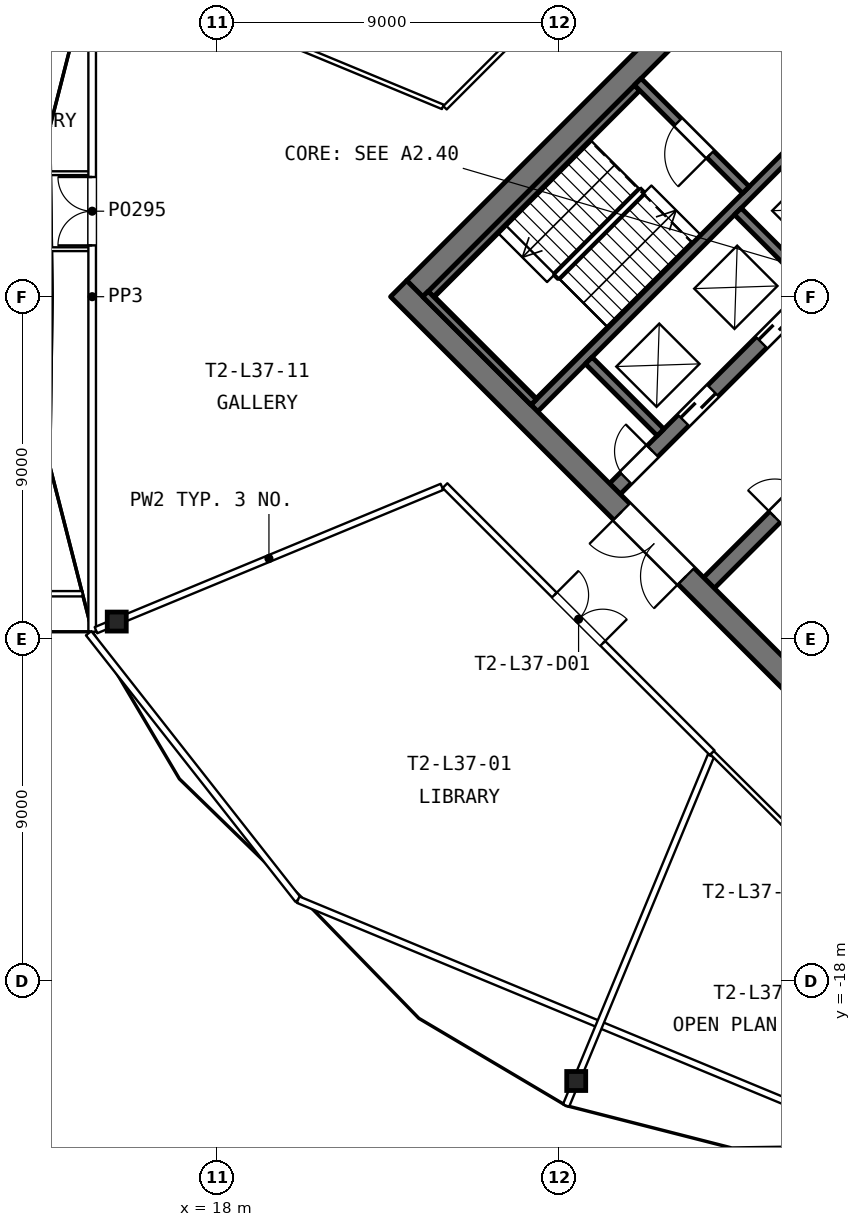
"""IFC4 building model, lengths in metres.
Left out: names, types, materials, properties, quantities, classifications, styles, units other than length and angle.
Written with IfcOpenShell. Run it as: python <this file> out.ifc"""

import sys

from ifc_helpers import new_model, si_unit, direction, frame, frame_2d, origin, origin_2d, place, context, subcontext, project, spatial, rectangle, hollow_rectangle, extrude, element, fill, save


model = new_model("IFC4")
c1 = context("Model", 3, precision=1e-05, world=origin(), true_north=direction((0.0, 1.0)))
c2 = subcontext(c1, "Body", "Model", "MODEL_VIEW")
j1 = project(units=[si_unit("LENGTHUNIT", "METRE"), si_unit("PLANEANGLEUNIT", "RADIAN")], contexts=[c1])
p1 = place(None, origin())
s1 = spatial("IfcSite", under=j1, at=p1, CompositionType="ELEMENT")
p2 = place(p1, origin())
s2 = spatial("IfcBuilding", under=s1, at=p2, CompositionType="ELEMENT")
p3 = place(p2, frame((0.0, 0.0, 156.8)))
s3 = spatial("IfcBuildingStorey", under=s2, at=p3, CompositionType="ELEMENT", Elevation=156.8)
for number, where, z_axis, x_axis in (
    (1, (15.361, -8.549, 0.0), (0.0, 0.0, 1.0), (1.0, 0.0, 0.0)),
    (2, (27.451, -20.639, 0.0), (0.0, 0.0, 1.0), (1.0, 0.0, 0.0)),
):
    element("IfcColumn", number, at=place(p3, frame(where, z_axis=z_axis, x_axis=x_axis)), inside=s3, PredefinedType="COLUMN", context=c2, shape_type="SweptSolid", body=[
        extrude(hollow_rectangle(XDim=0.5, YDim=0.5, WallThickness=0.03, at=origin_2d()), origin(), (0.0, 0.0, 1.0), 3.9),
    ])
p4 = place(p3, frame((30.944, -7.531, 0.0), z_axis=(0.0, 0.0, 1.0), x_axis=(0.707106781187, 0.707106781187, 0.0)))
e3 = element("IfcWall", 3, at=p4, inside=s3, PredefinedType="SHEAR", context=c2, shape_type="SweptSolid", body=[
    extrude(rectangle(XDim=17.8, YDim=0.4, at=frame_2d((8.9, 0.0))), origin(), (0.0, 0.0, 1.0), 3.7),
])
p5 = place(p4, frame((12.65, 0.0, 0.0)))
e4 = element("IfcOpeningElement", 4, at=p5, cuts=e3, PredefinedType="OPENING", context=c2, shape_type="SweptSolid", body=[
    extrude(rectangle(XDim=1.2, YDim=2.1, at=frame_2d((0.6, 1.05))), frame((0.0, 0.21, 0.0), z_axis=(0.0, -1.0, 0.0), x_axis=(1.0, 0.0, 0.0)), (0.0, 0.0, 1.0), 0.42),
])
p6 = place(p4, frame((15.65, 0.0, 0.0)))
e5 = element("IfcOpeningElement", 5, at=p6, cuts=e3, PredefinedType="OPENING", context=c2, shape_type="SweptSolid", body=[
    extrude(rectangle(XDim=1.1, YDim=2.1, at=frame_2d((0.55, 1.05))), frame((0.0, 0.21, 0.0), z_axis=(0.0, -1.0, 0.0), x_axis=(1.0, 0.0, 0.0)), (0.0, 0.0, 1.0), 0.42),
])
p7 = place(p4, frame((2.45, 0.0, 0.0)))
e6 = element("IfcOpeningElement", 6, at=p7, cuts=e3, PredefinedType="OPENING", context=c2, shape_type="SweptSolid", body=[
    extrude(rectangle(XDim=1.0, YDim=2.1, at=frame_2d((0.5, 1.05))), frame((0.0, 0.21, 0.0), z_axis=(0.0, -1.0, 0.0), x_axis=(1.0, 0.0, 0.0)), (0.0, 0.0, 1.0), 0.42),
])
p8 = place(p4, frame((8.4, 0.0, 0.0)))
e7 = element("IfcOpeningElement", 7, at=p8, cuts=e3, PredefinedType="OPENING", context=c2, shape_type="SweptSolid", body=[
    extrude(rectangle(XDim=1.0, YDim=2.1, at=frame_2d((0.5, 1.05))), frame((0.0, 0.21, 0.0), z_axis=(0.0, -1.0, 0.0), x_axis=(1.0, 0.0, 0.0)), (0.0, 0.0, 1.0), 0.42),
])
p9 = place(p3, frame((28.469, -5.056, 0.0), z_axis=(0.0, 0.0, 1.0), x_axis=(0.707106781187, 0.707106781187, 0.0)))
e8 = element("IfcWall", 8, at=p9, inside=s3, PredefinedType="SHEAR", context=c2, shape_type="SweptSolid", body=[
    extrude(rectangle(XDim=17.8, YDim=0.4, at=frame_2d((8.9, 0.0))), origin(), (0.0, 0.0, 1.0), 3.7),
])
p10 = place(p9, frame((0.4, 0.0, 0.0)))
e9 = element("IfcOpeningElement", 9, at=p10, cuts=e8, PredefinedType="OPENING", context=c2, shape_type="SweptSolid", body=[
    extrude(rectangle(XDim=1.0, YDim=2.1, at=frame_2d((0.5, 1.05))), frame((0.0, 0.21, 0.0), z_axis=(0.0, -1.0, 0.0), x_axis=(1.0, 0.0, 0.0)), (0.0, 0.0, 1.0), 0.42),
])
p11 = place(p9, frame((2.55, 0.0, 0.0)))
e10 = element("IfcOpeningElement", 10, at=p11, cuts=e8, PredefinedType="OPENING", context=c2, shape_type="SweptSolid", body=[
    extrude(rectangle(XDim=1.1, YDim=2.1, at=frame_2d((0.55, 1.05))), frame((0.0, 0.21, 0.0), z_axis=(0.0, -1.0, 0.0), x_axis=(1.0, 0.0, 0.0)), (0.0, 0.0, 1.0), 0.42),
])
p12 = place(p9, frame((5.45, 0.0, 0.0)))
e11 = element("IfcOpeningElement", 11, at=p12, cuts=e8, PredefinedType="OPENING", context=c2, shape_type="SweptSolid", body=[
    extrude(rectangle(XDim=1.1, YDim=2.1, at=frame_2d((0.55, 1.05))), frame((0.0, 0.21, 0.0), z_axis=(0.0, -1.0, 0.0), x_axis=(1.0, 0.0, 0.0)), (0.0, 0.0, 1.0), 0.42),
])
p13 = place(p9, frame((8.35, 0.0, 0.0)))
e12 = element("IfcOpeningElement", 12, at=p13, cuts=e8, PredefinedType="OPENING", context=c2, shape_type="SweptSolid", body=[
    extrude(rectangle(XDim=1.1, YDim=2.1, at=frame_2d((0.55, 1.05))), frame((0.0, 0.21, 0.0), z_axis=(0.0, -1.0, 0.0), x_axis=(1.0, 0.0, 0.0)), (0.0, 0.0, 1.0), 0.42),
])
p14 = place(p9, frame((11.25, 0.0, 0.0)))
e13 = element("IfcOpeningElement", 13, at=p14, cuts=e8, PredefinedType="OPENING", context=c2, shape_type="SweptSolid", body=[
    extrude(rectangle(XDim=1.1, YDim=2.1, at=frame_2d((0.55, 1.05))), frame((0.0, 0.21, 0.0), z_axis=(0.0, -1.0, 0.0), x_axis=(1.0, 0.0, 0.0)), (0.0, 0.0, 1.0), 0.42),
])
p15 = place(p9, frame((14.15, 0.0, 0.0)))
e14 = element("IfcOpeningElement", 14, at=p15, cuts=e8, PredefinedType="OPENING", context=c2, shape_type="SweptSolid", body=[
    extrude(rectangle(XDim=1.1, YDim=2.1, at=frame_2d((0.55, 1.05))), frame((0.0, 0.21, 0.0), z_axis=(0.0, -1.0, 0.0), x_axis=(1.0, 0.0, 0.0)), (0.0, 0.0, 1.0), 0.42),
])
p16 = place(p9, frame((16.4, 0.0, 0.0)))
e15 = element("IfcOpeningElement", 15, at=p16, cuts=e8, PredefinedType="OPENING", context=c2, shape_type="SweptSolid", body=[
    extrude(rectangle(XDim=1.0, YDim=2.1, at=frame_2d((0.5, 1.05))), frame((0.0, 0.21, 0.0), z_axis=(0.0, -1.0, 0.0), x_axis=(1.0, 0.0, 0.0)), (0.0, 0.0, 1.0), 0.42),
])
p17 = place(p3, frame((26.348, -2.935, 0.0), z_axis=(0.0, 0.0, 1.0), x_axis=(0.707106781187, 0.707106781187, 0.0)))
e16 = element("IfcWall", 16, at=p17, inside=s3, PredefinedType="SHEAR", context=c2, shape_type="SweptSolid", body=[
    extrude(rectangle(XDim=15.775, YDim=0.25, at=frame_2d((7.888, 0.0))), origin(), (0.0, 0.0, 1.0), 3.7),
])
p18 = place(p3, frame((23.625, 0.071, 0.0), z_axis=(0.0, 0.0, 1.0), x_axis=(0.707122685701, 0.707090876314, 0.0)))
e17 = element("IfcWall", 17, at=p18, inside=s3, PredefinedType="SHEAR", context=c2, shape_type="SweptSolid", body=[
    extrude(rectangle(XDim=7.675, YDim=0.2, at=frame_2d((3.837, 0.0))), origin(), (0.0, 0.0, 1.0), 3.7),
])
p19 = place(p3, frame((23.201, 0.212, 0.0), z_axis=(0.0, 0.0, 1.0), x_axis=(0.707106781187, 0.707106781187, 0.0)))
e18 = element("IfcWall", 18, at=p19, inside=s3, PredefinedType="SHEAR", context=c2, shape_type="SweptSolid", body=[
    extrude(rectangle(XDim=17.8, YDim=0.6, at=frame_2d((8.9, 0.0))), origin(), (0.0, 0.0, 1.0), 3.7),
])
p20 = place(p19, frame((9.1, 0.0, 0.0)))
e19 = element("IfcOpeningElement", 19, at=p20, cuts=e18, PredefinedType="OPENING", context=c2, shape_type="SweptSolid", body=[
    extrude(rectangle(XDim=1.2, YDim=2.1, at=frame_2d((0.6, 1.05))), frame((0.0, 0.31, 0.0), z_axis=(0.0, -1.0, 0.0), x_axis=(1.0, 0.0, 0.0)), (0.0, 0.0, 1.0), 0.62),
])
p21 = place(p19, frame((15.6, 0.0, 0.0)))
e20 = element("IfcOpeningElement", 20, at=p21, cuts=e18, PredefinedType="OPENING", context=c2, shape_type="SweptSolid", body=[
    extrude(rectangle(XDim=1.0, YDim=2.1, at=frame_2d((0.5, 1.05))), frame((0.0, 0.31, 0.0), z_axis=(0.0, -1.0, 0.0), x_axis=(1.0, 0.0, 0.0)), (0.0, 0.0, 1.0), 0.62),
])
p22 = place(p3, frame((36.212, -13.223, 0.0), z_axis=(0.0, 0.0, 1.0), x_axis=(-0.707106781187, 0.707106781187, 0.0)))
e21 = element("IfcWall", 21, at=p22, inside=s3, PredefinedType="SHEAR", context=c2, shape_type="SweptSolid", body=[
    extrude(rectangle(XDim=19.0, YDim=0.6, at=frame_2d((9.5, 0.0))), origin(), (0.0, 0.0, 1.0), 3.7),
])
p23 = place(p22, frame((8.3, 0.0, 0.0)))
e22 = element("IfcOpeningElement", 22, at=p23, cuts=e21, PredefinedType="OPENING", context=c2, shape_type="SweptSolid", body=[
    extrude(rectangle(XDim=2.4, YDim=2.1, at=frame_2d((1.2, 1.05))), frame((0.0, 0.31, 0.0), z_axis=(0.0, -1.0, 0.0), x_axis=(1.0, 0.0, 0.0)), (0.0, 0.0, 1.0), 0.62),
])
p24 = place(p3, frame((26.33, -2.775, 0.0), z_axis=(0.0, 0.0, 1.0), x_axis=(-0.707106781187, 0.707106781187, 0.0)))
e23 = element("IfcWall", 23, at=p24, inside=s3, PredefinedType="SHEAR", context=c2, shape_type="SweptSolid", body=[
    extrude(rectangle(XDim=4.025, YDim=0.2, at=frame_2d((2.013, 0.0))), origin(), (0.0, 0.0, 1.0), 3.7),
])
for number, where, z_axis, x_axis in (
    (24, (29.671, -3.571, 0.0), (0.0, 0.0, 1.0), (-0.707, 0.707, 0.0)),
    (25, (33.596, 0.354, 0.0), (0.0, 0.0, 1.0), (-0.707, 0.707, 0.0)),
):
    element("IfcWall", number, at=place(p3, frame(where, z_axis=z_axis, x_axis=x_axis)), inside=s3, PredefinedType="SHEAR", context=c2, shape_type="SweptSolid", body=[
        extrude(rectangle(XDim=2.675, YDim=0.25, at=frame_2d((1.337, 0.0))), origin(), (0.0, 0.0, 1.0), 3.7),
    ])
p25 = place(p3, frame((31.917, 2.811, 0.0), z_axis=(0.0, 0.0, 1.0), x_axis=(-0.707106781187, 0.707106781187, 0.0)))
e26 = element("IfcWall", 26, at=p25, inside=s3, PredefinedType="SHEAR", context=c2, shape_type="SweptSolid", body=[
    extrude(rectangle(XDim=4.025, YDim=0.25, at=frame_2d((2.013, 0.0))), origin(), (0.0, 0.0, 1.0), 3.7),
])
p26 = place(p25, frame((1.325, 0.0, 0.0)))
e27 = element("IfcOpeningElement", 27, at=p26, cuts=e26, PredefinedType="OPENING", context=c2, shape_type="SweptSolid", body=[
    extrude(rectangle(XDim=1.2, YDim=2.1, at=frame_2d((0.6, 1.05))), frame((0.0, 0.135, 0.0), z_axis=(0.0, -1.0, 0.0), x_axis=(1.0, 0.0, 0.0)), (0.0, 0.0, 1.0), 0.27),
])
p27 = place(p3, frame((34.321, 5.215, 0.0), z_axis=(0.0, 0.0, 1.0), x_axis=(-0.70707645213, 0.707137108942, 0.0)))
e28 = element("IfcWall", 28, at=p27, inside=s3, PredefinedType="SHEAR", context=c2, shape_type="SweptSolid", body=[
    extrude(rectangle(XDim=4.025, YDim=0.25, at=frame_2d((2.012, 0.0))), origin(), (0.0, 0.0, 1.0), 3.7),
])
p28 = place(p27, frame((1.025, 0.0, 0.0)))
e29 = element("IfcOpeningElement", 29, at=p28, cuts=e28, PredefinedType="OPENING", context=c2, shape_type="SweptSolid", body=[
    extrude(rectangle(XDim=1.2, YDim=2.1, at=frame_2d((0.6, 1.05))), frame((0.0, 0.135, 0.0), z_axis=(0.0, -1.0, 0.0), x_axis=(1.0, 0.0, 0.0)), (0.0, 0.0, 1.0), 0.27),
])
p29 = place(p3, frame((14.814, 8.776, 0.0), z_axis=(0.0, 0.0, 1.0), x_axis=(0.923880680571, -0.382680660691, 0.0)))
e30 = element("IfcWall", 30, at=p29, inside=s3, PredefinedType="PARTITIONING", context=c2, shape_type="SweptSolid", body=[
    extrude(rectangle(XDim=9.878, YDim=0.125, at=frame_2d((4.939, 0.0))), origin(), (0.0, 0.0, 1.0), 2.2),
])
p30 = place(p3, frame((14.814, -8.776, 0.0), z_axis=(0.0, 0.0, 1.0), x_axis=(0.923877614903, 0.382688061849, 0.0)))
e31 = element("IfcWall", 31, at=p30, inside=s3, PredefinedType="PARTITIONING", context=c2, shape_type="SweptSolid", body=[
    extrude(rectangle(XDim=9.853, YDim=0.175, at=frame_2d((4.927, 0.0))), origin(), (0.0, 0.0, 1.0), 2.2),
])
p31 = place(p3, frame((27.183, -21.286, 0.0), z_axis=(0.0, 0.0, 1.0), x_axis=(0.38267936462, 0.923881217416, 0.0)))
e32 = element("IfcWall", 32, at=p31, inside=s3, PredefinedType="PARTITIONING", context=c2, shape_type="SweptSolid", body=[
    extrude(rectangle(XDim=9.961, YDim=0.175, at=frame_2d((4.981, 0.0))), origin(), (0.0, 0.0, 1.0), 2.2),
])
p32 = place(p3, frame((23.998, -4.971, 0.0), z_axis=(0.0, 0.0, 1.0), x_axis=(0.707106781187, -0.707106781187, 0.0)))
e33 = element("IfcWall", 33, at=p32, inside=s3, PredefinedType="PARTITIONING", context=c2, shape_type="SweptSolid", body=[
    extrude(rectangle(XDim=9.943, YDim=0.175, at=frame_2d((4.972, 0.0))), origin(), (0.0, 0.0, 1.0), 2.5),
])
p33 = place(p32, frame((4.071, 0.0, 0.0)))
e34 = element("IfcOpeningElement", 34, at=p33, cuts=e33, PredefinedType="OPENING", context=c2, shape_type="SweptSolid", body=[
    extrude(rectangle(XDim=1.8, YDim=2.1, at=frame_2d((0.9, 1.05))), frame((0.0, 0.098, 0.0), z_axis=(0.0, -1.0, 0.0), x_axis=(1.0, 0.0, 0.0)), (0.0, 0.0, 1.0), 0.195),
])
p34 = place(p3, frame((31.029, -12.002, 0.0), z_axis=(0.0, 0.0, 1.0), x_axis=(0.709332667605, -0.704873865786, 0.0)))
e35 = element("IfcWall", 35, at=p34, inside=s3, PredefinedType="PARTITIONING", context=c2, shape_type="SweptSolid", body=[
    extrude(rectangle(XDim=7.009, YDim=0.125, at=frame_2d((3.504, 0.0))), origin(), (0.0, 0.0, 1.0), 2.5),
])
p35 = place(p34, frame((2.604, 0.0, 0.0)))
e36 = element("IfcOpeningElement", 36, at=p35, cuts=e35, PredefinedType="OPENING", context=c2, shape_type="SweptSolid", body=[
    extrude(rectangle(XDim=1.8, YDim=2.1, at=frame_2d((0.9, 1.05))), frame((0.0, 0.073, 0.0), z_axis=(0.0, -1.0, 0.0), x_axis=(1.0, 0.0, 0.0)), (0.0, 0.0, 1.0), 0.145),
])
p36 = place(p3, frame((33.188, 14.164, 0.0), z_axis=(0.0, 0.0, 1.0), x_axis=(-0.706994076888, -0.707219467524, 0.0)))
e37 = element("IfcWall", 37, at=p36, inside=s3, PredefinedType="PARTITIONING", context=c2, shape_type="SweptSolid", body=[
    extrude(rectangle(XDim=12.998, YDim=0.125, at=frame_2d((6.499, 0.0))), origin(), (0.0, 0.0, 1.0), 2.5),
])
p37 = place(p36, frame((5.599, 0.0, 0.0)))
e38 = element("IfcOpeningElement", 38, at=p37, cuts=e37, PredefinedType="OPENING", context=c2, shape_type="SweptSolid", body=[
    extrude(rectangle(XDim=1.8, YDim=2.1, at=frame_2d((0.9, 1.05))), frame((0.0, 0.073, 0.0), z_axis=(0.0, -1.0, 0.0), x_axis=(1.0, 0.0, 0.0)), (0.0, 0.0, 1.0), 0.145),
])
p38 = place(p3, frame((9.617, 3.25, 0.0), z_axis=(0.0, 0.0, 1.0), x_axis=(1.0, 0.0, 0.0)))
e39 = element("IfcWall", 39, at=p38, inside=s3, PredefinedType="PARTITIONING", context=c2, shape_type="SweptSolid", body=[
    extrude(rectangle(XDim=5.097, YDim=0.1, at=frame_2d((2.548, 0.0))), origin(), (0.0, 0.0, 1.0), 2.9),
])
p39 = place(p38, frame((1.648, 0.0, 0.0)))
e40 = element("IfcOpeningElement", 40, at=p39, cuts=e39, PredefinedType="OPENING", context=c2, shape_type="SweptSolid", body=[
    extrude(rectangle(XDim=1.8, YDim=2.1, at=frame_2d((0.9, 1.05))), frame((0.0, 0.06, 0.0), z_axis=(0.0, -1.0, 0.0), x_axis=(1.0, 0.0, 0.0)), (0.0, 0.0, 1.0), 0.12),
])
p40 = place(p3, frame((0.85, 1.25, 0.0), z_axis=(0.0, 0.0, 1.0), x_axis=(1.0, 0.0, 0.0)))
e41 = element("IfcWall", 41, at=p40, inside=s3, PredefinedType="PARTITIONING", context=c2, shape_type="SweptSolid", body=[
    extrude(rectangle(XDim=13.864, YDim=0.1, at=frame_2d((6.932, 0.0))), origin(), (0.0, 0.0, 1.0), 2.9),
])
p41 = place(p40, frame((3.739, 0.0, 0.0)))
e42 = element("IfcOpeningElement", 42, at=p41, cuts=e41, PredefinedType="OPENING", context=c2, shape_type="SweptSolid", body=[
    extrude(rectangle(XDim=1.8, YDim=2.1, at=frame_2d((0.9, 1.05))), frame((0.0, 0.06, 0.0), z_axis=(0.0, -1.0, 0.0), x_axis=(1.0, 0.0, 0.0)), (0.0, 0.0, 1.0), 0.12),
])
p42 = place(p40, frame((8.325, 0.0, 0.0)))
e43 = element("IfcOpeningElement", 43, at=p42, cuts=e41, PredefinedType="OPENING", context=c2, shape_type="SweptSolid", body=[
    extrude(rectangle(XDim=1.8, YDim=2.1, at=frame_2d((0.9, 1.05))), frame((0.0, 0.06, 0.0), z_axis=(0.0, -1.0, 0.0), x_axis=(1.0, 0.0, 0.0)), (0.0, 0.0, 1.0), 0.12),
])
p43 = place(p3, frame((14.714, -8.817, 0.0), z_axis=(0.0, 0.0, 1.0), x_axis=(0.0, 1.0, 0.0)))
e44 = element("IfcWall", 44, at=p43, inside=s3, PredefinedType="PARTITIONING", context=c2, shape_type="SweptSolid", body=[
    extrude(rectangle(XDim=17.634, YDim=0.2, at=frame_2d((8.817, 0.0))), origin(), (0.0, 0.0, 1.0), 3.7),
])
p44 = place(p43, frame((10.167, 0.0, 0.0)))
e45 = element("IfcOpeningElement", 45, at=p44, cuts=e44, PredefinedType="OPENING", context=c2, shape_type="SweptSolid", body=[
    extrude(rectangle(XDim=1.8, YDim=2.1, at=frame_2d((0.9, 1.05))), frame((0.0, 0.11, 0.0), z_axis=(0.0, -1.0, 0.0), x_axis=(1.0, 0.0, 0.0)), (0.0, 0.0, 1.0), 0.22),
])
p45 = place(p23, origin())
e46 = element("IfcDoor", 46, at=p45, inside=s3, OperationType="DOUBLE_DOOR_SINGLE_SWING", PredefinedType="DOOR", context=c2, shape_type="SweptSolid", body=[
    extrude(rectangle(XDim=2.4, YDim=2.1, at=frame_2d((1.2, 1.05))), frame((0.0, -0.125, 0.0), z_axis=(0.0, -1.0, 0.0), x_axis=(1.0, 0.0, 0.0)), (0.0, 0.0, 1.0), 0.05),
])
fill(e22, e46)
p46 = place(p10, origin())
e47 = element("IfcDoor", 47, at=p46, inside=s3, OperationType="SINGLE_SWING_RIGHT", PredefinedType="DOOR", context=c2, shape_type="SweptSolid", body=[
    extrude(rectangle(XDim=1.0, YDim=2.1, at=frame_2d((0.5, 1.05))), frame((0.0, 0.025, 0.0), z_axis=(0.0, -1.0, 0.0), x_axis=(1.0, 0.0, 0.0)), (0.0, 0.0, 1.0), 0.05),
])
fill(e9, e47)
p47 = place(p11, origin())
e48 = element("IfcDoor", 48, at=p47, inside=s3, OperationType="SLIDING_TO_LEFT", PredefinedType="DOOR", context=c2, shape_type="SweptSolid", body=[
    extrude(rectangle(XDim=1.1, YDim=2.1, at=frame_2d((0.55, 1.05))), frame((0.0, 0.025, 0.0), z_axis=(0.0, -1.0, 0.0), x_axis=(1.0, 0.0, 0.0)), (0.0, 0.0, 1.0), 0.05),
])
fill(e10, e48)
p48 = place(p12, origin())
e49 = element("IfcDoor", 49, at=p48, inside=s3, OperationType="SLIDING_TO_LEFT", PredefinedType="DOOR", context=c2, shape_type="SweptSolid", body=[
    extrude(rectangle(XDim=1.1, YDim=2.1, at=frame_2d((0.55, 1.05))), frame((0.0, 0.025, 0.0), z_axis=(0.0, -1.0, 0.0), x_axis=(1.0, 0.0, 0.0)), (0.0, 0.0, 1.0), 0.05),
])
fill(e11, e49)
p49 = place(p28, origin())
e50 = element("IfcDoor", 50, at=p49, inside=s3, OperationType="SLIDING_TO_LEFT", PredefinedType="DOOR", context=c2, shape_type="SweptSolid", body=[
    extrude(rectangle(XDim=1.2, YDim=2.1, at=frame_2d((0.6, 1.05))), frame((0.0, 0.025, 0.0), z_axis=(0.0, -1.0, 0.0), x_axis=(1.0, 0.0, 0.0)), (0.0, 0.0, 1.0), 0.05),
])
fill(e29, e50)
p50 = place(p7, origin())
e51 = element("IfcDoor", 51, at=p50, inside=s3, OperationType="SINGLE_SWING_LEFT", PredefinedType="DOOR", context=c2, shape_type="SweptSolid", body=[
    extrude(rectangle(XDim=1.0, YDim=2.1, at=frame_2d((0.5, 1.05))), frame((0.0, 0.025, 0.0), z_axis=(0.0, -1.0, 0.0), x_axis=(1.0, 0.0, 0.0)), (0.0, 0.0, 1.0), 0.05),
])
fill(e6, e51)
p51 = place(p26, origin())
e52 = element("IfcDoor", 52, at=p51, inside=s3, OperationType="SINGLE_SWING_LEFT", PredefinedType="DOOR", context=c2, shape_type="SweptSolid", body=[
    extrude(rectangle(XDim=1.2, YDim=2.1, at=frame_2d((0.6, 1.05))), frame((0.0, 0.025, 0.0), z_axis=(0.0, -1.0, 0.0), x_axis=(1.0, 0.0, 0.0)), (0.0, 0.0, 1.0), 0.05),
])
fill(e27, e52)
p52 = place(p33, origin())
e53 = element("IfcDoor", 53, at=p52, inside=s3, OperationType="DOUBLE_DOOR_DOUBLE_SWING", PredefinedType="DOOR", context=c2, shape_type="SweptSolid", body=[
    extrude(rectangle(XDim=1.8, YDim=2.1, at=frame_2d((0.9, 1.05))), frame((0.0, 0.025, 0.0), z_axis=(0.0, -1.0, 0.0), x_axis=(1.0, 0.0, 0.0)), (0.0, 0.0, 1.0), 0.05),
])
fill(e34, e53)
p53 = place(p44, origin())
e54 = element("IfcDoor", 54, at=p53, inside=s3, OperationType="DOUBLE_DOOR_DOUBLE_SWING", PredefinedType="DOOR", context=c2, shape_type="SweptSolid", body=[
    extrude(rectangle(XDim=1.8, YDim=2.1, at=frame_2d((0.9, 1.05))), frame((0.0, 0.025, 0.0), z_axis=(0.0, -1.0, 0.0), x_axis=(1.0, 0.0, 0.0)), (0.0, 0.0, 1.0), 0.05),
])
fill(e45, e54)
save(model, sys.argv[1])
